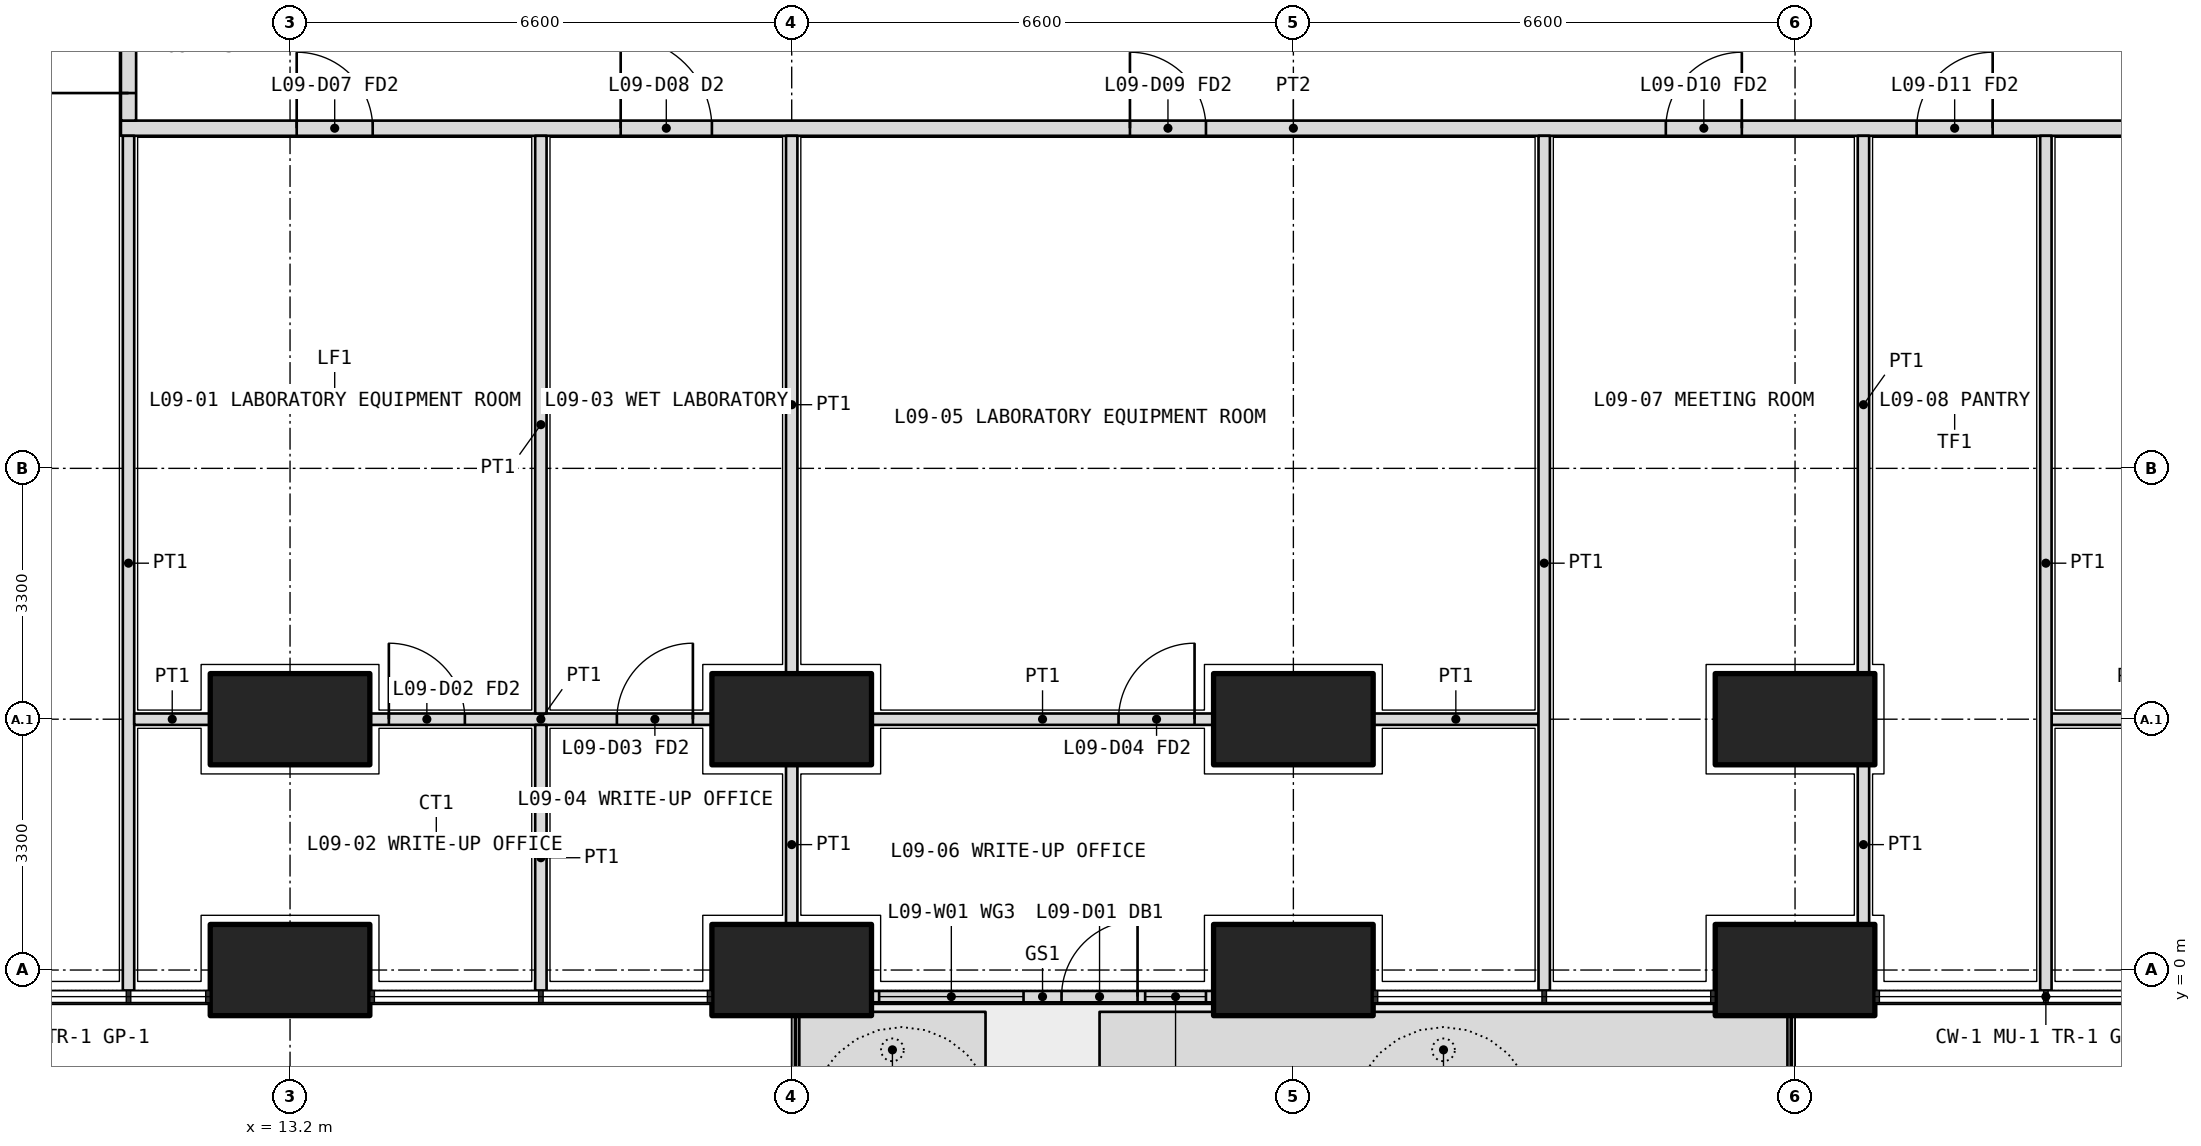
"""IFC4 building model, lengths in metres.
Left out: names, types, materials, properties, quantities, classifications, styles, units other than length and angle.
Written with IfcOpenShell. Run it as: python <this file> out.ifc"""

import sys

from ifc_helpers import new_model, si_unit, direction, frame, frame_2d, origin, origin_2d, place, context, subcontext, project, spatial, polyline, rectangle, outline, extrude, element, fill, save


model = new_model("IFC4")
c1 = context("Model", 3, precision=1e-05, world=origin(), true_north=direction((0.0, 1.0)))
c2 = subcontext(c1, "Body", "Model", "MODEL_VIEW")
j1 = project(units=[si_unit("LENGTHUNIT", "METRE"), si_unit("PLANEANGLEUNIT", "RADIAN")], contexts=[c1])
p1 = place(None, origin())
s1 = spatial("IfcSite", under=j1, at=p1, CompositionType="ELEMENT")
p2 = place(p1, origin())
s2 = spatial("IfcBuilding", under=s1, at=p2, CompositionType="ELEMENT")
p3 = place(p2, frame((0.0, 0.0, 42.3)))
s3 = spatial("IfcBuildingStorey", under=s2, at=p3, CompositionType="ELEMENT", Elevation=42.3)
for number, where, z_axis, x_axis in (
    (1, (13.2, 0.0, 0.0), (0.0, 0.0, 1.0), (1.0, 0.0, 0.0)),
    (2, (19.8, 0.0, 0.0), (0.0, 0.0, 1.0), (1.0, 0.0, 0.0)),
    (3, (26.4, 0.0, 0.0), (0.0, 0.0, 1.0), (1.0, 0.0, 0.0)),
    (4, (33.0, 0.0, 0.0), (0.0, 0.0, 1.0), (1.0, 0.0, 0.0)),
    (5, (13.2, 3.3, 0.0), (0.0, 0.0, 1.0), (1.0, 0.0, 0.0)),
    (6, (19.8, 3.3, 0.0), (0.0, 0.0, 1.0), (1.0, 0.0, 0.0)),
    (7, (26.4, 3.3, 0.0), (0.0, 0.0, 1.0), (1.0, 0.0, 0.0)),
    (8, (33.0, 3.3, 0.0), (0.0, 0.0, 1.0), (1.0, 0.0, 0.0)),
):
    element("IfcColumn", number, at=place(p3, frame(where, z_axis=z_axis, x_axis=x_axis)), inside=s3, PredefinedType="COLUMN", context=c2, shape_type="SweptSolid", body=[
        extrude(rectangle(XDim=2.1, YDim=1.2, at=origin_2d()), origin(), (0.0, 0.0, 1.0), 4.2),
    ])
p4 = place(p3, origin())
e9 = element("IfcWall", 9, at=p4, inside=s3, PredefinedType="USERDEFINED", context=c2, shape_type="SweptSolid", body=[
    extrude(outline(polyline([(19.9, -1.55), (22.35, -1.55), (22.35, -0.55), (19.9, -0.55), (19.9, -1.55)]), holes=[polyline([(20.05, -1.4), (22.2, -1.4), (22.2, -0.7), (20.05, -0.7), (20.05, -1.4)])]), origin(), (0.0, 0.0, 1.0), 1.05),
])
p5 = place(p3, origin())
e10 = element("IfcWall", 10, at=p5, inside=s3, PredefinedType="USERDEFINED", context=c2, shape_type="SweptSolid", body=[
    extrude(outline(polyline([(23.85, -1.55), (32.9, -1.55), (32.9, -0.55), (23.85, -0.55), (23.85, -1.55)]), holes=[polyline([(24.0, -1.4), (32.75, -1.4), (32.75, -0.7), (24.0, -0.7), (24.0, -1.4)])]), origin(), (0.0, 0.0, 1.0), 1.05),
])
p6 = place(p3, frame((20.85, -0.35, 0.0), z_axis=(0.0, 0.0, 1.0), x_axis=(1.0, 0.0, 0.0)))
e11 = element("IfcWall", 11, at=p6, inside=s3, PredefinedType="SOLIDWALL", context=c2, shape_type="SweptSolid", body=[
    extrude(rectangle(XDim=4.5, YDim=0.15, at=frame_2d((2.25, 0.0))), origin(), (0.0, 0.0, 1.0), 2.7),
])
p7 = place(p6, frame((2.5, 0.0, 0.0)))
e12 = element("IfcOpeningElement", 12, at=p7, cuts=e11, PredefinedType="OPENING", context=c2, shape_type="SweptSolid", body=[
    extrude(rectangle(XDim=1.0, YDim=2.4, at=frame_2d((0.5, 1.2))), frame((0.0, 0.085, 0.0), z_axis=(0.0, -1.0, 0.0), x_axis=(1.0, 0.0, 0.0)), (0.0, 0.0, 1.0), 0.17),
])
p8 = place(p6, frame((0.1, 0.0, 0.1)))
e13 = element("IfcOpeningElement", 13, at=p8, cuts=e11, PredefinedType="OPENING", context=c2, shape_type="SweptSolid", body=[
    extrude(rectangle(XDim=1.9, YDim=2.3, at=frame_2d((0.95, 1.15))), frame((0.0, 0.085, 0.0), z_axis=(0.0, -1.0, 0.0), x_axis=(1.0, 0.0, 0.0)), (0.0, 0.0, 1.0), 0.17),
])
p9 = place(p6, frame((3.6, 0.0, 0.1)))
e14 = element("IfcOpeningElement", 14, at=p9, cuts=e11, PredefinedType="OPENING", context=c2, shape_type="SweptSolid", body=[
    extrude(rectangle(XDim=0.8, YDim=2.3, at=frame_2d((0.4, 1.15))), frame((0.0, 0.085, 0.0), z_axis=(0.0, -1.0, 0.0), x_axis=(1.0, 0.0, 0.0)), (0.0, 0.0, 1.0), 0.17),
])
p10 = place(p3, frame((10.975, 11.075, 0.0), z_axis=(0.0, 0.0, 1.0), x_axis=(1.0, 0.0, 0.0)))
e15 = element("IfcWall", 15, at=p10, inside=s3, PredefinedType="PARTITIONING", context=c2, shape_type="SweptSolid", body=[
    extrude(rectangle(XDim=30.85, YDim=0.2, at=frame_2d((15.425, 0.0))), origin(), (0.0, 0.0, 1.0), 2.85),
])
p11 = place(p10, frame((2.312, 0.0, 0.0)))
e16 = element("IfcOpeningElement", 16, at=p11, cuts=e15, PredefinedType="OPENING", context=c2, shape_type="SweptSolid", body=[
    extrude(rectangle(XDim=1.0, YDim=2.1, at=frame_2d((0.5, 1.05))), frame((0.0, 0.11, 0.0), z_axis=(0.0, -1.0, 0.0), x_axis=(1.0, 0.0, 0.0)), (0.0, 0.0, 1.0), 0.22),
])
p12 = place(p10, frame((6.575, 0.0, 0.0)))
e17 = element("IfcOpeningElement", 17, at=p12, cuts=e15, PredefinedType="OPENING", context=c2, shape_type="SweptSolid", body=[
    extrude(rectangle(XDim=1.2, YDim=2.1, at=frame_2d((0.6, 1.05))), frame((0.0, 0.11, 0.0), z_axis=(0.0, -1.0, 0.0), x_axis=(1.0, 0.0, 0.0)), (0.0, 0.0, 1.0), 0.22),
])
p13 = place(p10, frame((13.275, 0.0, 0.0)))
e18 = element("IfcOpeningElement", 18, at=p13, cuts=e15, PredefinedType="OPENING", context=c2, shape_type="SweptSolid", body=[
    extrude(rectangle(XDim=1.0, YDim=2.1, at=frame_2d((0.5, 1.05))), frame((0.0, 0.11, 0.0), z_axis=(0.0, -1.0, 0.0), x_axis=(1.0, 0.0, 0.0)), (0.0, 0.0, 1.0), 0.22),
])
p14 = place(p10, frame((20.325, 0.0, 0.0)))
e19 = element("IfcOpeningElement", 19, at=p14, cuts=e15, PredefinedType="OPENING", context=c2, shape_type="SweptSolid", body=[
    extrude(rectangle(XDim=1.0, YDim=2.1, at=frame_2d((0.5, 1.05))), frame((0.0, 0.11, 0.0), z_axis=(0.0, -1.0, 0.0), x_axis=(1.0, 0.0, 0.0)), (0.0, 0.0, 1.0), 0.22),
])
p15 = place(p10, frame((23.625, 0.0, 0.0)))
e20 = element("IfcOpeningElement", 20, at=p15, cuts=e15, PredefinedType="OPENING", context=c2, shape_type="SweptSolid", body=[
    extrude(rectangle(XDim=1.0, YDim=2.1, at=frame_2d((0.5, 1.05))), frame((0.0, 0.11, 0.0), z_axis=(0.0, -1.0, 0.0), x_axis=(1.0, 0.0, 0.0)), (0.0, 0.0, 1.0), 0.22),
])
p16 = place(p10, frame((27.438, 0.0, 0.0)))
e21 = element("IfcOpeningElement", 21, at=p16, cuts=e15, PredefinedType="OPENING", context=c2, shape_type="SweptSolid", body=[
    extrude(rectangle(XDim=1.2, YDim=2.1, at=frame_2d((0.6, 1.05))), frame((0.0, 0.11, 0.0), z_axis=(0.0, -1.0, 0.0), x_axis=(1.0, 0.0, 0.0)), (0.0, 0.0, 1.0), 0.22),
])
p17 = place(p3, frame((11.075, 11.175, 0.0), z_axis=(0.0, 0.0, 1.0), x_axis=(0.0, 1.0, 0.0)))
e22 = element("IfcWall", 22, at=p17, inside=s3, PredefinedType="PARTITIONING", context=c2, shape_type="SweptSolid", body=[
    extrude(rectangle(XDim=15.225, YDim=0.2, at=frame_2d((7.612, 0.0))), origin(), (0.0, 0.0, 1.0), 2.85),
])
p18 = place(p17, frame((0.363, 0.0, 0.0)))
e23 = element("IfcOpeningElement", 23, at=p18, cuts=e22, PredefinedType="OPENING", context=c2, shape_type="SweptSolid", body=[
    extrude(rectangle(XDim=1.2, YDim=2.1, at=frame_2d((0.6, 1.05))), frame((0.0, 0.11, 0.0), z_axis=(0.0, -1.0, 0.0), x_axis=(1.0, 0.0, 0.0)), (0.0, 0.0, 1.0), 0.22),
])
p19 = place(p17, frame((2.575, 0.0, 0.0)))
e24 = element("IfcOpeningElement", 24, at=p19, cuts=e22, PredefinedType="OPENING", context=c2, shape_type="SweptSolid", body=[
    extrude(rectangle(XDim=1.0, YDim=2.1, at=frame_2d((0.5, 1.05))), frame((0.0, 0.11, 0.0), z_axis=(0.0, -1.0, 0.0), x_axis=(1.0, 0.0, 0.0)), (0.0, 0.0, 1.0), 0.22),
])
p20 = place(p17, frame((5.65, 0.0, 0.0)))
e25 = element("IfcOpeningElement", 25, at=p20, cuts=e22, PredefinedType="OPENING", context=c2, shape_type="SweptSolid", body=[
    extrude(rectangle(XDim=0.9, YDim=2.1, at=frame_2d((0.45, 1.05))), frame((0.0, 0.11, 0.0), z_axis=(0.0, -1.0, 0.0), x_axis=(1.0, 0.0, 0.0)), (0.0, 0.0, 1.0), 0.22),
])
p21 = place(p17, frame((9.5, 0.0, 0.0)))
e26 = element("IfcOpeningElement", 26, at=p21, cuts=e22, PredefinedType="OPENING", context=c2, shape_type="SweptSolid", body=[
    extrude(rectangle(XDim=0.9, YDim=2.1, at=frame_2d((0.45, 1.05))), frame((0.0, 0.11, 0.0), z_axis=(0.0, -1.0, 0.0), x_axis=(1.0, 0.0, 0.0)), (0.0, 0.0, 1.0), 0.22),
])
p22 = place(p17, frame((13.025, 0.0, 0.0)))
e27 = element("IfcOpeningElement", 27, at=p22, cuts=e22, PredefinedType="OPENING", context=c2, shape_type="SweptSolid", body=[
    extrude(rectangle(XDim=1.0, YDim=2.1, at=frame_2d((0.5, 1.05))), frame((0.0, 0.11, 0.0), z_axis=(0.0, -1.0, 0.0), x_axis=(1.0, 0.0, 0.0)), (0.0, 0.0, 1.0), 0.22),
])
p23 = place(p3, frame((11.075, -0.27, 0.0), z_axis=(0.0, 0.0, 1.0), x_axis=(0.0, 1.0, 0.0)))
e28 = element("IfcWall", 28, at=p23, inside=s3, PredefinedType="PARTITIONING", context=c2, shape_type="SweptSolid", body=[
    extrude(rectangle(XDim=11.245, YDim=0.15, at=frame_2d((5.623, 0.0))), origin(), (0.0, 0.0, 1.0), 2.7),
])
p24 = place(p3, frame((11.15, 3.3, 0.0), z_axis=(0.0, 0.0, 1.0), x_axis=(1.0, 0.0, 0.0)))
e29 = element("IfcWall", 29, at=p24, inside=s3, PredefinedType="PARTITIONING", context=c2, shape_type="SweptSolid", body=[
    extrude(rectangle(XDim=1.0, YDim=0.15, at=frame_2d((0.5, 0.0))), origin(), (0.0, 0.0, 1.0), 3.9),
])
p25 = place(p3, frame((14.25, 3.3, 0.0), z_axis=(0.0, 0.0, 1.0), x_axis=(1.0, 0.0, 0.0)))
e30 = element("IfcWall", 30, at=p25, inside=s3, PredefinedType="PARTITIONING", context=c2, shape_type="SweptSolid", body=[
    extrude(rectangle(XDim=4.5, YDim=0.15, at=frame_2d((2.25, 0.0))), origin(), (0.0, 0.0, 1.0), 3.9),
])
p26 = place(p25, frame((0.25, 0.0, 0.0)))
e31 = element("IfcOpeningElement", 31, at=p26, cuts=e30, PredefinedType="OPENING", context=c2, shape_type="SweptSolid", body=[
    extrude(rectangle(XDim=1.0, YDim=2.1, at=frame_2d((0.5, 1.05))), frame((0.0, 0.085, 0.0), z_axis=(0.0, -1.0, 0.0), x_axis=(1.0, 0.0, 0.0)), (0.0, 0.0, 1.0), 0.17),
])
p27 = place(p25, frame((3.25, 0.0, 0.0)))
e32 = element("IfcOpeningElement", 32, at=p27, cuts=e30, PredefinedType="OPENING", context=c2, shape_type="SweptSolid", body=[
    extrude(rectangle(XDim=1.0, YDim=2.1, at=frame_2d((0.5, 1.05))), frame((0.0, 0.085, 0.0), z_axis=(0.0, -1.0, 0.0), x_axis=(1.0, 0.0, 0.0)), (0.0, 0.0, 1.0), 0.17),
])
p28 = place(p3, frame((20.85, 3.3, 0.0), z_axis=(0.0, 0.0, 1.0), x_axis=(1.0, 0.0, 0.0)))
e33 = element("IfcWall", 33, at=p28, inside=s3, PredefinedType="PARTITIONING", context=c2, shape_type="SweptSolid", body=[
    extrude(rectangle(XDim=4.5, YDim=0.15, at=frame_2d((2.25, 0.0))), origin(), (0.0, 0.0, 1.0), 3.9),
])
p29 = place(p28, frame((3.25, 0.0, 0.0)))
e34 = element("IfcOpeningElement", 34, at=p29, cuts=e33, PredefinedType="OPENING", context=c2, shape_type="SweptSolid", body=[
    extrude(rectangle(XDim=1.0, YDim=2.1, at=frame_2d((0.5, 1.05))), frame((0.0, 0.085, 0.0), z_axis=(0.0, -1.0, 0.0), x_axis=(1.0, 0.0, 0.0)), (0.0, 0.0, 1.0), 0.17),
])
for number, where, z_axis, x_axis in (
    (35, (27.45, 3.3, 0.0), (0.0, 0.0, 1.0), (1.0, 0.0, 0.0)),
    (36, (36.375, 3.3, 0.0), (0.0, 0.0, 1.0), (1.0, 0.0, 0.0)),
):
    element("IfcWall", number, at=place(p3, frame(where, z_axis=z_axis, x_axis=x_axis)), inside=s3, PredefinedType="PARTITIONING", context=c2, shape_type="SweptSolid", body=[
        extrude(rectangle(XDim=2.175, YDim=0.15, at=frame_2d((1.087, 0.0))), origin(), (0.0, 0.0, 1.0), 3.9),
    ])
p30 = place(p3, frame((33.9, 0.6, 0.0), z_axis=(0.0, 0.0, 1.0), x_axis=(0.0, 1.0, 0.0)))
e37 = element("IfcWall", 37, at=p30, inside=s3, PredefinedType="PARTITIONING", context=c2, shape_type="SweptSolid", body=[
    extrude(rectangle(XDim=2.1, YDim=0.15, at=frame_2d((1.05, 0.0))), origin(), (0.0, 0.0, 1.0), 3.9),
])
p31 = place(p3, frame((33.9, 3.9, 0.0), z_axis=(0.0, 0.0, 1.0), x_axis=(0.0, 1.0, 0.0)))
e38 = element("IfcWall", 38, at=p31, inside=s3, PredefinedType="PARTITIONING", context=c2, shape_type="SweptSolid", body=[
    extrude(rectangle(XDim=7.075, YDim=0.15, at=frame_2d((3.538, 0.0))), origin(), (0.0, 0.0, 1.0), 3.9),
])
p32 = place(p3, frame((36.3, -0.27, 0.0), z_axis=(0.0, 0.0, 1.0), x_axis=(0.0, 1.0, 0.0)))
e39 = element("IfcWall", 39, at=p32, inside=s3, PredefinedType="PARTITIONING", context=c2, shape_type="SweptSolid", body=[
    extrude(rectangle(XDim=11.245, YDim=0.15, at=frame_2d((5.623, 0.0))), origin(), (0.0, 0.0, 1.0), 2.7),
])
p33 = place(p3, frame((16.5, -0.27, 0.0), z_axis=(0.0, 0.0, 1.0), x_axis=(0.0, 1.0, 0.0)))
e40 = element("IfcWall", 40, at=p33, inside=s3, PredefinedType="PARTITIONING", context=c2, shape_type="SweptSolid", body=[
    extrude(rectangle(XDim=3.495, YDim=0.15, at=frame_2d((1.748, 0.0))), origin(), (0.0, 0.0, 1.0), 2.7),
])
p34 = place(p3, frame((16.5, 3.375, 0.0), z_axis=(0.0, 0.0, 1.0), x_axis=(0.0, 1.0, 0.0)))
e41 = element("IfcWall", 41, at=p34, inside=s3, PredefinedType="PARTITIONING", context=c2, shape_type="SweptSolid", body=[
    extrude(rectangle(XDim=7.6, YDim=0.15, at=frame_2d((3.8, 0.0))), origin(), (0.0, 0.0, 1.0), 3.9),
])
p35 = place(p3, frame((19.8, 0.6, 0.0), z_axis=(0.0, 0.0, 1.0), x_axis=(0.0, 1.0, 0.0)))
e42 = element("IfcWall", 42, at=p35, inside=s3, PredefinedType="PARTITIONING", context=c2, shape_type="SweptSolid", body=[
    extrude(rectangle(XDim=2.1, YDim=0.15, at=frame_2d((1.05, 0.0))), origin(), (0.0, 0.0, 1.0), 2.85),
])
p36 = place(p3, frame((19.8, 3.9, 0.0), z_axis=(0.0, 0.0, 1.0), x_axis=(0.0, 1.0, 0.0)))
e43 = element("IfcWall", 43, at=p36, inside=s3, PredefinedType="PARTITIONING", context=c2, shape_type="SweptSolid", body=[
    extrude(rectangle(XDim=7.075, YDim=0.15, at=frame_2d((3.538, 0.0))), origin(), (0.0, 0.0, 1.0), 2.85),
])
p37 = place(p3, frame((29.7, -0.27, 0.0), z_axis=(0.0, 0.0, 1.0), x_axis=(0.0, 1.0, 0.0)))
e44 = element("IfcWall", 44, at=p37, inside=s3, PredefinedType="PARTITIONING", context=c2, shape_type="SweptSolid", body=[
    extrude(rectangle(XDim=11.245, YDim=0.15, at=frame_2d((5.623, 0.0))), origin(), (0.0, 0.0, 1.0), 2.7),
])
p38 = place(p7, origin())
e45 = element("IfcDoor", 45, at=p38, inside=s3, OperationType="SINGLE_SWING_RIGHT", PredefinedType="DOOR", context=c2, shape_type="SweptSolid", body=[
    extrude(rectangle(XDim=1.0, YDim=2.4, at=frame_2d((0.5, 1.2))), frame((0.0, 0.025, 0.0), z_axis=(0.0, -1.0, 0.0), x_axis=(1.0, 0.0, 0.0)), (0.0, 0.0, 1.0), 0.05),
])
fill(e12, e45)
p39 = place(p8, origin())
e46 = element("IfcWindow", 46, at=p39, inside=s3, PartitioningType="SINGLE_PANEL", PredefinedType="WINDOW", context=c2, shape_type="SweptSolid", body=[
    extrude(rectangle(XDim=1.9, YDim=2.3, at=frame_2d((0.95, 1.15))), frame((0.0, 0.03, 0.0), z_axis=(0.0, -1.0, 0.0), x_axis=(1.0, 0.0, 0.0)), (0.0, 0.0, 1.0), 0.06),
])
fill(e13, e46)
p40 = place(p9, origin())
e47 = element("IfcWindow", 47, at=p40, inside=s3, PartitioningType="SINGLE_PANEL", PredefinedType="WINDOW", context=c2, shape_type="SweptSolid", body=[
    extrude(rectangle(XDim=0.8, YDim=2.3, at=frame_2d((0.4, 1.15))), frame((0.0, 0.03, 0.0), z_axis=(0.0, -1.0, 0.0), x_axis=(1.0, 0.0, 0.0)), (0.0, 0.0, 1.0), 0.06),
])
fill(e14, e47)
p41 = place(p11, origin())
e48 = element("IfcDoor", 48, at=p41, inside=s3, OperationType="SINGLE_SWING_LEFT", PredefinedType="DOOR", context=c2, shape_type="SweptSolid", body=[
    extrude(rectangle(XDim=1.0, YDim=2.1, at=frame_2d((0.5, 1.05))), frame((0.0, 0.025, 0.0), z_axis=(0.0, -1.0, 0.0), x_axis=(1.0, 0.0, 0.0)), (0.0, 0.0, 1.0), 0.05),
])
fill(e16, e48)
p42 = place(p26, origin())
e49 = element("IfcDoor", 49, at=p42, inside=s3, OperationType="SINGLE_SWING_LEFT", PredefinedType="DOOR", context=c2, shape_type="SweptSolid", body=[
    extrude(rectangle(XDim=1.0, YDim=2.1, at=frame_2d((0.5, 1.05))), frame((0.0, 0.025, 0.0), z_axis=(0.0, -1.0, 0.0), x_axis=(1.0, 0.0, 0.0)), (0.0, 0.0, 1.0), 0.05),
])
fill(e31, e49)
p43 = place(p12, origin())
e50 = element("IfcDoor", 50, at=p43, inside=s3, OperationType="DOUBLE_DOOR_SINGLE_SWING", PredefinedType="DOOR", context=c2, shape_type="SweptSolid", body=[
    extrude(rectangle(XDim=1.2, YDim=2.1, at=frame_2d((0.6, 1.05))), frame((0.0, 0.025, 0.0), z_axis=(0.0, -1.0, 0.0), x_axis=(1.0, 0.0, 0.0)), (0.0, 0.0, 1.0), 0.05),
])
fill(e17, e50)
p44 = place(p27, origin())
e51 = element("IfcDoor", 51, at=p44, inside=s3, OperationType="SINGLE_SWING_RIGHT", PredefinedType="DOOR", context=c2, shape_type="SweptSolid", body=[
    extrude(rectangle(XDim=1.0, YDim=2.1, at=frame_2d((0.5, 1.05))), frame((0.0, 0.025, 0.0), z_axis=(0.0, -1.0, 0.0), x_axis=(1.0, 0.0, 0.0)), (0.0, 0.0, 1.0), 0.05),
])
fill(e32, e51)
p45 = place(p13, origin())
e52 = element("IfcDoor", 52, at=p45, inside=s3, OperationType="SINGLE_SWING_LEFT", PredefinedType="DOOR", context=c2, shape_type="SweptSolid", body=[
    extrude(rectangle(XDim=1.0, YDim=2.1, at=frame_2d((0.5, 1.05))), frame((0.0, 0.025, 0.0), z_axis=(0.0, -1.0, 0.0), x_axis=(1.0, 0.0, 0.0)), (0.0, 0.0, 1.0), 0.05),
])
fill(e18, e52)
p46 = place(p29, origin())
e53 = element("IfcDoor", 53, at=p46, inside=s3, OperationType="SINGLE_SWING_RIGHT", PredefinedType="DOOR", context=c2, shape_type="SweptSolid", body=[
    extrude(rectangle(XDim=1.0, YDim=2.1, at=frame_2d((0.5, 1.05))), frame((0.0, 0.025, 0.0), z_axis=(0.0, -1.0, 0.0), x_axis=(1.0, 0.0, 0.0)), (0.0, 0.0, 1.0), 0.05),
])
fill(e34, e53)
p47 = place(p14, origin())
e54 = element("IfcDoor", 54, at=p47, inside=s3, OperationType="SINGLE_SWING_RIGHT", PredefinedType="DOOR", context=c2, shape_type="SweptSolid", body=[
    extrude(rectangle(XDim=1.0, YDim=2.1, at=frame_2d((0.5, 1.05))), frame((0.0, 0.025, 0.0), z_axis=(0.0, -1.0, 0.0), x_axis=(1.0, 0.0, 0.0)), (0.0, 0.0, 1.0), 0.05),
])
fill(e19, e54)
p48 = place(p15, origin())
e55 = element("IfcDoor", 55, at=p48, inside=s3, OperationType="SINGLE_SWING_RIGHT", PredefinedType="DOOR", context=c2, shape_type="SweptSolid", body=[
    extrude(rectangle(XDim=1.0, YDim=2.1, at=frame_2d((0.5, 1.05))), frame((0.0, 0.025, 0.0), z_axis=(0.0, -1.0, 0.0), x_axis=(1.0, 0.0, 0.0)), (0.0, 0.0, 1.0), 0.05),
])
fill(e20, e55)
p49 = place(p18, origin())
e56 = element("IfcDoor", 56, at=p49, inside=s3, OperationType="DOUBLE_DOOR_SINGLE_SWING", PredefinedType="DOOR", context=c2, shape_type="SweptSolid", body=[
    extrude(rectangle(XDim=1.2, YDim=2.1, at=frame_2d((0.6, 1.05))), frame((0.0, 0.025, 0.0), z_axis=(0.0, -1.0, 0.0), x_axis=(1.0, 0.0, 0.0)), (0.0, 0.0, 1.0), 0.05),
])
fill(e23, e56)
save(model, sys.argv[1])
